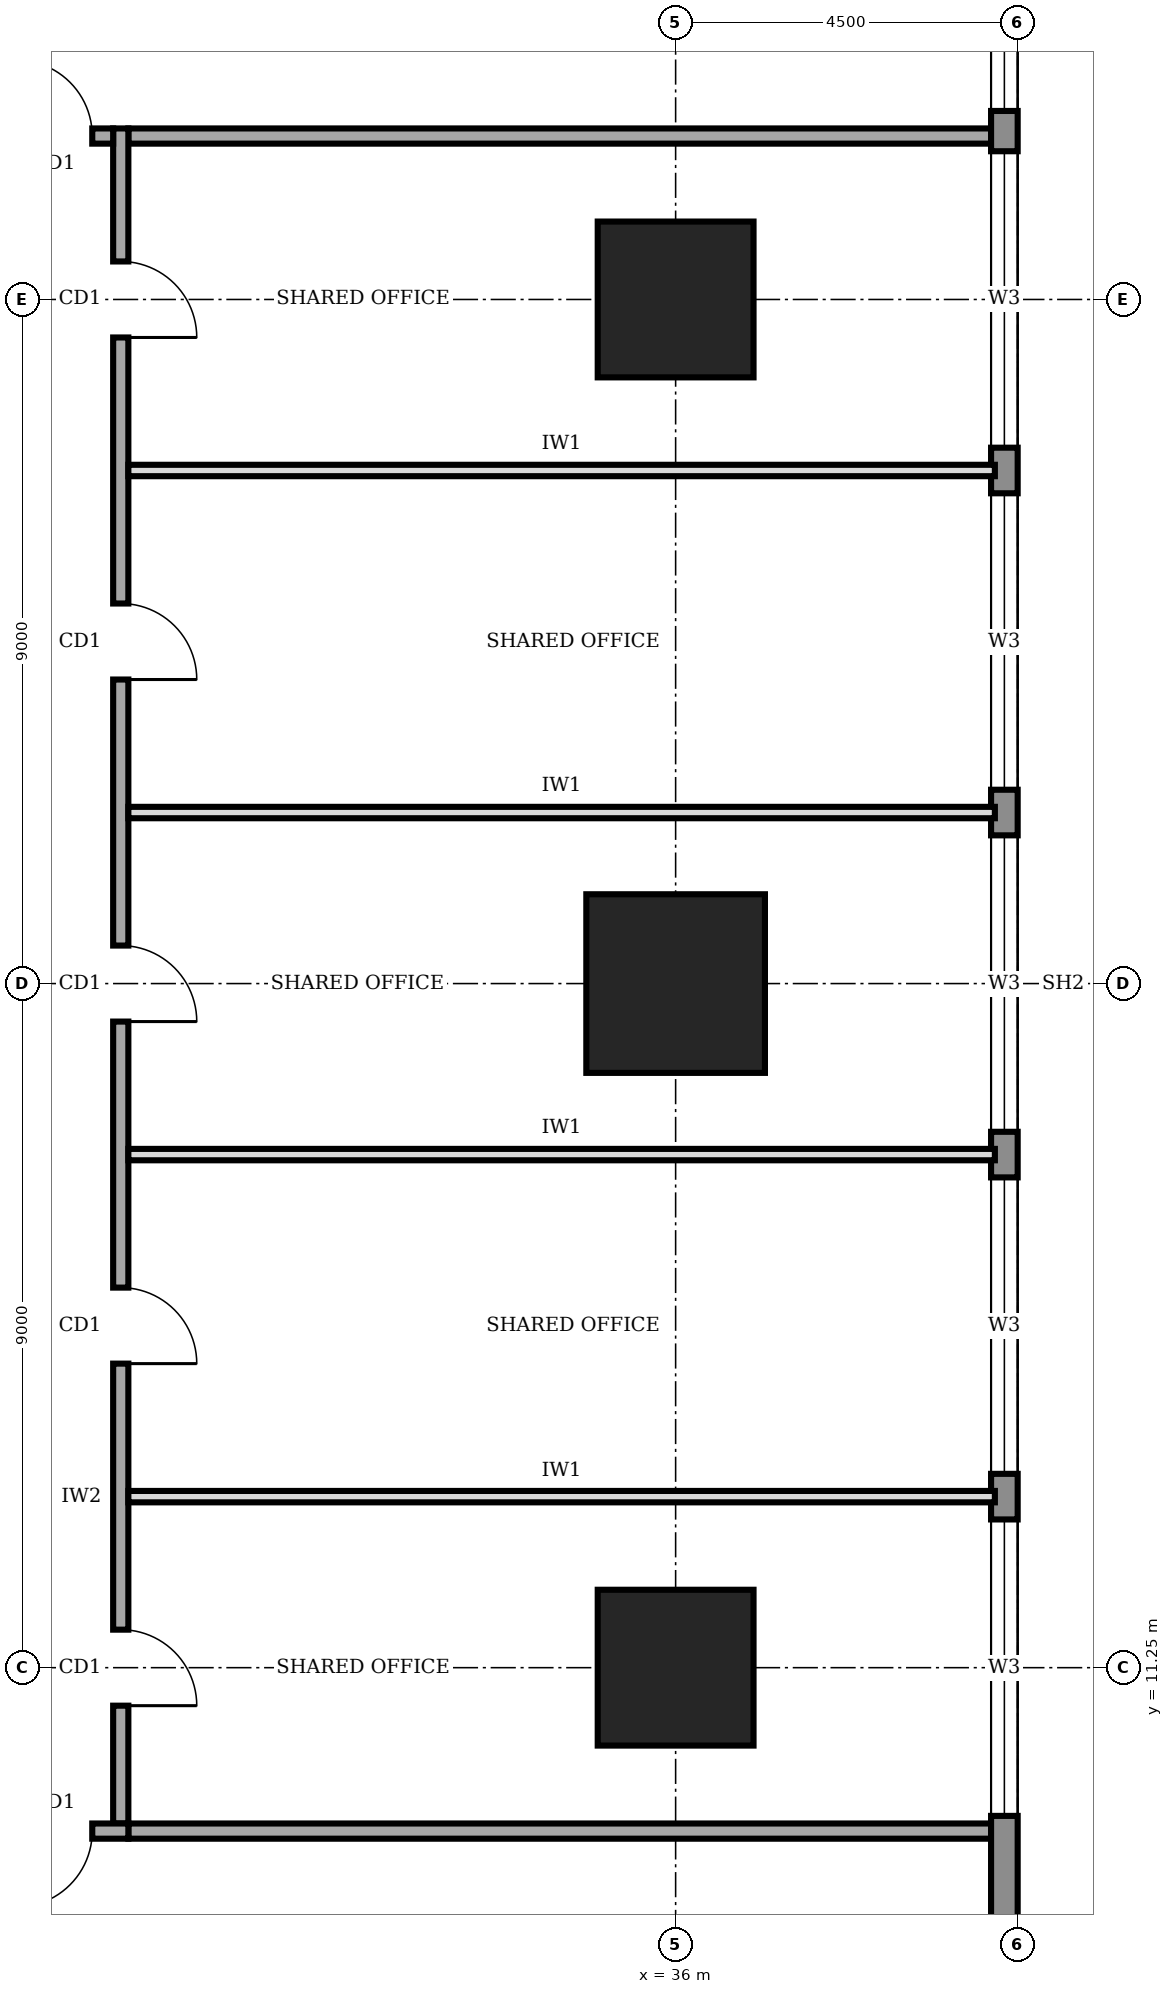
"""IFC4 building model, lengths in metres.
Left out: names, types, materials, properties, quantities, classifications, styles, units other than length and angle.
Written with IfcOpenShell. Run it as: python <this file> out.ifc"""

import sys

from ifc_helpers import new_model, si_unit, direction, frame, frame_2d, origin, origin_2d, place, context, subcontext, project, spatial, rectangle, extrude, element, fill, save


model = new_model("IFC4")
c1 = context("Model", 3, precision=1e-05, world=origin(), true_north=direction((0.0, 1.0)))
c2 = subcontext(c1, "Body", "Model", "MODEL_VIEW")
j1 = project(units=[si_unit("LENGTHUNIT", "METRE"), si_unit("PLANEANGLEUNIT", "RADIAN")], contexts=[c1])
p1 = place(None, origin())
s1 = spatial("IfcSite", under=j1, at=p1, CompositionType="ELEMENT")
p2 = place(p1, origin())
s2 = spatial("IfcBuilding", under=s1, at=p2, CompositionType="ELEMENT")
p3 = place(p2, frame((0.0, 0.0, 185.0)))
s3 = spatial("IfcBuildingStorey", under=s2, at=p3, CompositionType="ELEMENT", Elevation=185.0)
p4 = place(p3, frame((36.0, 11.25, 0.0), z_axis=(0.0, 0.0, 1.0), x_axis=(1.0, 0.0, 0.0)))
e1 = element("IfcColumn", 1, at=p4, inside=s3, PredefinedType="COLUMN", context=c2, shape_type="SweptSolid", body=[
    extrude(rectangle(XDim=2.05, YDim=2.05, at=origin_2d()), origin(), (0.0, 0.0, 1.0), 4.0),
])
p5 = place(p3, frame((36.0, 20.25, 0.0), z_axis=(0.0, 0.0, 1.0), x_axis=(1.0, 0.0, 0.0)))
e2 = element("IfcColumn", 2, at=p5, inside=s3, PredefinedType="COLUMN", context=c2, shape_type="SweptSolid", body=[
    extrude(rectangle(XDim=2.35, YDim=2.35, at=origin_2d()), origin(), (0.0, 0.0, 1.0), 4.0),
])
p6 = place(p3, frame((36.0, 29.25, 0.0), z_axis=(0.0, 0.0, 1.0), x_axis=(1.0, 0.0, 0.0)))
e3 = element("IfcColumn", 3, at=p6, inside=s3, PredefinedType="COLUMN", context=c2, shape_type="SweptSolid", body=[
    extrude(rectangle(XDim=2.05, YDim=2.05, at=origin_2d()), origin(), (0.0, 0.0, 1.0), 4.0),
])
p7 = place(p3, frame((40.325, 4.52, 0.0), z_axis=(0.0, 0.0, 1.0), x_axis=(0.0, 1.0, 0.0)))
e4 = element("IfcWall", 4, at=p7, inside=s3, PredefinedType="STANDARD", context=c2, shape_type="SweptSolid", body=[
    extrude(rectangle(XDim=31.46, YDim=0.35, at=frame_2d((15.73, 0.0))), origin(), (0.0, 0.0, 1.0), 3.75),
])
p8 = place(p7, frame((4.78, 0.0, 0.95)))
e5 = element("IfcOpeningElement", 5, at=p8, cuts=e4, PredefinedType="OPENING", context=c2, shape_type="SweptSolid", body=[
    extrude(rectangle(XDim=3.9, YDim=1.8, at=frame_2d((1.95, 0.9))), frame((0.0, 0.185, 0.0), z_axis=(0.0, -1.0, 0.0), x_axis=(1.0, 0.0, 0.0)), (0.0, 0.0, 1.0), 0.37),
])
p9 = place(p7, frame((9.28, 0.0, 0.95)))
e6 = element("IfcOpeningElement", 6, at=p9, cuts=e4, PredefinedType="OPENING", context=c2, shape_type="SweptSolid", body=[
    extrude(rectangle(XDim=3.9, YDim=1.8, at=frame_2d((1.95, 0.9))), frame((0.0, 0.185, 0.0), z_axis=(0.0, -1.0, 0.0), x_axis=(1.0, 0.0, 0.0)), (0.0, 0.0, 1.0), 0.37),
])
p10 = place(p7, frame((13.78, 0.0, 0.95)))
e7 = element("IfcOpeningElement", 7, at=p10, cuts=e4, PredefinedType="OPENING", context=c2, shape_type="SweptSolid", body=[
    extrude(rectangle(XDim=3.9, YDim=1.8, at=frame_2d((1.95, 0.9))), frame((0.0, 0.185, 0.0), z_axis=(0.0, -1.0, 0.0), x_axis=(1.0, 0.0, 0.0)), (0.0, 0.0, 1.0), 0.37),
])
p11 = place(p7, frame((18.28, 0.0, 0.95)))
e8 = element("IfcOpeningElement", 8, at=p11, cuts=e4, PredefinedType="OPENING", context=c2, shape_type="SweptSolid", body=[
    extrude(rectangle(XDim=3.9, YDim=1.8, at=frame_2d((1.95, 0.9))), frame((0.0, 0.185, 0.0), z_axis=(0.0, -1.0, 0.0), x_axis=(1.0, 0.0, 0.0)), (0.0, 0.0, 1.0), 0.37),
])
p12 = place(p7, frame((22.78, 0.0, 0.95)))
e9 = element("IfcOpeningElement", 9, at=p12, cuts=e4, PredefinedType="OPENING", context=c2, shape_type="SweptSolid", body=[
    extrude(rectangle(XDim=3.9, YDim=1.8, at=frame_2d((1.95, 0.9))), frame((0.0, 0.185, 0.0), z_axis=(0.0, -1.0, 0.0), x_axis=(1.0, 0.0, 0.0)), (0.0, 0.0, 1.0), 0.37),
])
p13 = place(p7, frame((27.21, 0.0, 0.95)))
e10 = element("IfcOpeningElement", 10, at=p13, cuts=e4, PredefinedType="OPENING", context=c2, shape_type="SweptSolid", body=[
    extrude(rectangle(XDim=3.9, YDim=1.8, at=frame_2d((1.95, 0.9))), frame((0.0, 0.185, 0.0), z_axis=(0.0, -1.0, 0.0), x_axis=(1.0, 0.0, 0.0)), (0.0, 0.0, 1.0), 0.37),
])
p14 = place(p3, frame((11.9, 9.1, 0.0), z_axis=(0.0, 0.0, 1.0), x_axis=(1.0, 0.0, 0.0)))
e11 = element("IfcWall", 11, at=p14, inside=s3, PredefinedType="SOLIDWALL", context=c2, shape_type="SweptSolid", body=[
    extrude(rectangle(XDim=16.9, YDim=0.2, at=frame_2d((8.45, 0.0))), origin(), (0.0, 0.0, 1.0), 3.75),
])
p15 = place(p14, frame((15.425, 0.0, 0.0)))
e12 = element("IfcOpeningElement", 12, at=p15, cuts=e11, PredefinedType="OPENING", context=c2, shape_type="SweptSolid", body=[
    extrude(rectangle(XDim=1.0, YDim=2.1, at=frame_2d((0.5, 1.05))), frame((0.0, 0.11, 0.0), z_axis=(0.0, -1.0, 0.0), x_axis=(1.0, 0.0, 0.0)), (0.0, 0.0, 1.0), 0.22),
])
p16 = place(p3, frame((28.7, 9.2, 0.0), z_axis=(0.0, 0.0, 1.0), x_axis=(0.0, 1.0, 0.0)))
e13 = element("IfcWall", 13, at=p16, inside=s3, PredefinedType="SOLIDWALL", context=c2, shape_type="SweptSolid", body=[
    extrude(rectangle(XDim=22.3, YDim=0.2, at=frame_2d((11.15, 0.0))), origin(), (0.0, 0.0, 1.0), 3.75),
])
p17 = place(p16, frame((1.55, 0.0, 0.0)))
e14 = element("IfcOpeningElement", 14, at=p17, cuts=e13, PredefinedType="OPENING", context=c2, shape_type="SweptSolid", body=[
    extrude(rectangle(XDim=1.0, YDim=2.1, at=frame_2d((0.5, 1.05))), frame((0.0, 0.11, 0.0), z_axis=(0.0, -1.0, 0.0), x_axis=(1.0, 0.0, 0.0)), (0.0, 0.0, 1.0), 0.22),
])
p18 = place(p16, frame((6.05, 0.0, 0.0)))
e15 = element("IfcOpeningElement", 15, at=p18, cuts=e13, PredefinedType="OPENING", context=c2, shape_type="SweptSolid", body=[
    extrude(rectangle(XDim=1.0, YDim=2.1, at=frame_2d((0.5, 1.05))), frame((0.0, 0.11, 0.0), z_axis=(0.0, -1.0, 0.0), x_axis=(1.0, 0.0, 0.0)), (0.0, 0.0, 1.0), 0.22),
])
p19 = place(p16, frame((10.55, 0.0, 0.0)))
e16 = element("IfcOpeningElement", 16, at=p19, cuts=e13, PredefinedType="OPENING", context=c2, shape_type="SweptSolid", body=[
    extrude(rectangle(XDim=1.0, YDim=2.1, at=frame_2d((0.5, 1.05))), frame((0.0, 0.11, 0.0), z_axis=(0.0, -1.0, 0.0), x_axis=(1.0, 0.0, 0.0)), (0.0, 0.0, 1.0), 0.22),
])
p20 = place(p16, frame((15.05, 0.0, 0.0)))
e17 = element("IfcOpeningElement", 17, at=p20, cuts=e13, PredefinedType="OPENING", context=c2, shape_type="SweptSolid", body=[
    extrude(rectangle(XDim=1.0, YDim=2.1, at=frame_2d((0.5, 1.05))), frame((0.0, 0.11, 0.0), z_axis=(0.0, -1.0, 0.0), x_axis=(1.0, 0.0, 0.0)), (0.0, 0.0, 1.0), 0.22),
])
p21 = place(p16, frame((19.55, 0.0, 0.0)))
e18 = element("IfcOpeningElement", 18, at=p21, cuts=e13, PredefinedType="OPENING", context=c2, shape_type="SweptSolid", body=[
    extrude(rectangle(XDim=1.0, YDim=2.1, at=frame_2d((0.5, 1.05))), frame((0.0, 0.11, 0.0), z_axis=(0.0, -1.0, 0.0), x_axis=(1.0, 0.0, 0.0)), (0.0, 0.0, 1.0), 0.22),
])
p22 = place(p3, frame((28.6, 31.4, 0.0), z_axis=(0.0, 0.0, 1.0), x_axis=(-1.0, 0.0, 0.0)))
e19 = element("IfcWall", 19, at=p22, inside=s3, PredefinedType="SOLIDWALL", context=c2, shape_type="SweptSolid", body=[
    extrude(rectangle(XDim=16.9, YDim=0.2, at=frame_2d((8.45, 0.0))), origin(), (0.0, 0.0, 1.0), 3.75),
])
p23 = place(p22, frame((15.425, 0.0, 0.0)))
e20 = element("IfcOpeningElement", 20, at=p23, cuts=e19, PredefinedType="OPENING", context=c2, shape_type="SweptSolid", body=[
    extrude(rectangle(XDim=1.0, YDim=2.1, at=frame_2d((0.5, 1.05))), frame((0.0, 0.11, 0.0), z_axis=(0.0, -1.0, 0.0), x_axis=(1.0, 0.0, 0.0)), (0.0, 0.0, 1.0), 0.22),
])
p24 = place(p22, frame((12.35, 0.0, 0.0)))
e21 = element("IfcOpeningElement", 21, at=p24, cuts=e19, PredefinedType="OPENING", context=c2, shape_type="SweptSolid", body=[
    extrude(rectangle(XDim=1.0, YDim=2.1, at=frame_2d((0.5, 1.05))), frame((0.0, 0.11, 0.0), z_axis=(0.0, -1.0, 0.0), x_axis=(1.0, 0.0, 0.0)), (0.0, 0.0, 1.0), 0.22),
])
p25 = place(p22, frame((5.6, 0.0, 0.0)))
e22 = element("IfcOpeningElement", 22, at=p25, cuts=e19, PredefinedType="OPENING", context=c2, shape_type="SweptSolid", body=[
    extrude(rectangle(XDim=1.0, YDim=2.1, at=frame_2d((0.5, 1.05))), frame((0.0, 0.11, 0.0), z_axis=(0.0, -1.0, 0.0), x_axis=(1.0, 0.0, 0.0)), (0.0, 0.0, 1.0), 0.22),
])
p26 = place(p22, frame((0.275, 0.0, 0.0)))
e23 = element("IfcOpeningElement", 23, at=p26, cuts=e19, PredefinedType="OPENING", context=c2, shape_type="SweptSolid", body=[
    extrude(rectangle(XDim=1.0, YDim=2.1, at=frame_2d((0.5, 1.05))), frame((0.0, 0.11, 0.0), z_axis=(0.0, -1.0, 0.0), x_axis=(1.0, 0.0, 0.0)), (0.0, 0.0, 1.0), 0.22),
])
for number, where, z_axis, x_axis in (
    (24, (28.8, 9.1, 0.0), (0.0, 0.0, 1.0), (1.0, 0.0, 0.0)),
    (25, (28.8, 31.4, 0.0), (0.0, 0.0, 1.0), (1.0, 0.0, 0.0)),
):
    element("IfcWall", number, at=place(p3, frame(where, z_axis=z_axis, x_axis=x_axis)), inside=s3, PredefinedType="SOLIDWALL", context=c2, shape_type="SweptSolid", body=[
        extrude(rectangle(XDim=11.4, YDim=0.2, at=frame_2d((5.7, 0.0))), origin(), (0.0, 0.0, 1.0), 3.75),
    ])
for number, where, z_axis, x_axis in (
    (26, (28.8, 13.5, 0.0), (0.0, 0.0, 1.0), (1.0, 0.0, 0.0)),
    (27, (28.8, 18.0, 0.0), (0.0, 0.0, 1.0), (1.0, 0.0, 0.0)),
    (28, (28.8, 22.5, 0.0), (0.0, 0.0, 1.0), (1.0, 0.0, 0.0)),
    (29, (28.8, 27.0, 0.0), (0.0, 0.0, 1.0), (1.0, 0.0, 0.0)),
):
    element("IfcWall", number, at=place(p3, frame(where, z_axis=z_axis, x_axis=x_axis)), inside=s3, PredefinedType="PARTITIONING", context=c2, shape_type="SweptSolid", body=[
        extrude(rectangle(XDim=11.4, YDim=0.15, at=frame_2d((5.7, 0.0))), origin(), (0.0, 0.0, 1.0), 3.75),
    ])
p27 = place(p8, origin())
e30 = element("IfcWindow", 30, at=p27, inside=s3, PartitioningType="SINGLE_PANEL", PredefinedType="WINDOW", context=c2, shape_type="SweptSolid", body=[
    extrude(rectangle(XDim=3.9, YDim=1.8, at=frame_2d((1.95, 0.9))), frame((0.0, 0.03, 0.0), z_axis=(0.0, -1.0, 0.0), x_axis=(1.0, 0.0, 0.0)), (0.0, 0.0, 1.0), 0.06),
])
fill(e5, e30)
p28 = place(p9, origin())
e31 = element("IfcWindow", 31, at=p28, inside=s3, PartitioningType="SINGLE_PANEL", PredefinedType="WINDOW", context=c2, shape_type="SweptSolid", body=[
    extrude(rectangle(XDim=3.9, YDim=1.8, at=frame_2d((1.95, 0.9))), frame((0.0, 0.03, 0.0), z_axis=(0.0, -1.0, 0.0), x_axis=(1.0, 0.0, 0.0)), (0.0, 0.0, 1.0), 0.06),
])
fill(e6, e31)
p29 = place(p10, origin())
e32 = element("IfcWindow", 32, at=p29, inside=s3, PartitioningType="SINGLE_PANEL", PredefinedType="WINDOW", context=c2, shape_type="SweptSolid", body=[
    extrude(rectangle(XDim=3.9, YDim=1.8, at=frame_2d((1.95, 0.9))), frame((0.0, 0.03, 0.0), z_axis=(0.0, -1.0, 0.0), x_axis=(1.0, 0.0, 0.0)), (0.0, 0.0, 1.0), 0.06),
])
fill(e7, e32)
p30 = place(p11, origin())
e33 = element("IfcWindow", 33, at=p30, inside=s3, PartitioningType="SINGLE_PANEL", PredefinedType="WINDOW", context=c2, shape_type="SweptSolid", body=[
    extrude(rectangle(XDim=3.9, YDim=1.8, at=frame_2d((1.95, 0.9))), frame((0.0, 0.03, 0.0), z_axis=(0.0, -1.0, 0.0), x_axis=(1.0, 0.0, 0.0)), (0.0, 0.0, 1.0), 0.06),
])
fill(e8, e33)
p31 = place(p12, origin())
e34 = element("IfcWindow", 34, at=p31, inside=s3, PartitioningType="SINGLE_PANEL", PredefinedType="WINDOW", context=c2, shape_type="SweptSolid", body=[
    extrude(rectangle(XDim=3.9, YDim=1.8, at=frame_2d((1.95, 0.9))), frame((0.0, 0.03, 0.0), z_axis=(0.0, -1.0, 0.0), x_axis=(1.0, 0.0, 0.0)), (0.0, 0.0, 1.0), 0.06),
])
fill(e9, e34)
p32 = place(p13, origin())
e35 = element("IfcWindow", 35, at=p32, inside=s3, PartitioningType="SINGLE_PANEL", PredefinedType="WINDOW", context=c2, shape_type="SweptSolid", body=[
    extrude(rectangle(XDim=3.9, YDim=1.8, at=frame_2d((1.95, 0.9))), frame((0.0, 0.03, 0.0), z_axis=(0.0, -1.0, 0.0), x_axis=(1.0, 0.0, 0.0)), (0.0, 0.0, 1.0), 0.06),
])
fill(e10, e35)
p33 = place(p15, frame((1.0, 0.0, 0.0), z_axis=(0.0, 0.0, 1.0), x_axis=(-1.0, 0.0, 0.0)))
e36 = element("IfcDoor", 36, at=p33, inside=s3, OperationType="SINGLE_SWING_RIGHT", PredefinedType="DOOR", context=c2, shape_type="SweptSolid", body=[
    extrude(rectangle(XDim=1.0, YDim=2.1, at=frame_2d((0.5, 1.05))), frame((0.0, 0.025, 0.0), z_axis=(0.0, -1.0, 0.0), x_axis=(1.0, 0.0, 0.0)), (0.0, 0.0, 1.0), 0.05),
])
fill(e12, e36)
p34 = place(p17, frame((1.0, 0.0, 0.0), z_axis=(0.0, 0.0, 1.0), x_axis=(-1.0, 0.0, 0.0)))
e37 = element("IfcDoor", 37, at=p34, inside=s3, OperationType="SINGLE_SWING_RIGHT", PredefinedType="DOOR", context=c2, shape_type="SweptSolid", body=[
    extrude(rectangle(XDim=1.0, YDim=2.1, at=frame_2d((0.5, 1.05))), frame((0.0, 0.025, 0.0), z_axis=(0.0, -1.0, 0.0), x_axis=(1.0, 0.0, 0.0)), (0.0, 0.0, 1.0), 0.05),
])
fill(e14, e37)
p35 = place(p18, frame((1.0, 0.0, 0.0), z_axis=(0.0, 0.0, 1.0), x_axis=(-1.0, 0.0, 0.0)))
e38 = element("IfcDoor", 38, at=p35, inside=s3, OperationType="SINGLE_SWING_RIGHT", PredefinedType="DOOR", context=c2, shape_type="SweptSolid", body=[
    extrude(rectangle(XDim=1.0, YDim=2.1, at=frame_2d((0.5, 1.05))), frame((0.0, 0.025, 0.0), z_axis=(0.0, -1.0, 0.0), x_axis=(1.0, 0.0, 0.0)), (0.0, 0.0, 1.0), 0.05),
])
fill(e15, e38)
p36 = place(p19, frame((1.0, 0.0, 0.0), z_axis=(0.0, 0.0, 1.0), x_axis=(-1.0, 0.0, 0.0)))
e39 = element("IfcDoor", 39, at=p36, inside=s3, OperationType="SINGLE_SWING_RIGHT", PredefinedType="DOOR", context=c2, shape_type="SweptSolid", body=[
    extrude(rectangle(XDim=1.0, YDim=2.1, at=frame_2d((0.5, 1.05))), frame((0.0, 0.025, 0.0), z_axis=(0.0, -1.0, 0.0), x_axis=(1.0, 0.0, 0.0)), (0.0, 0.0, 1.0), 0.05),
])
fill(e16, e39)
p37 = place(p20, frame((1.0, 0.0, 0.0), z_axis=(0.0, 0.0, 1.0), x_axis=(-1.0, 0.0, 0.0)))
e40 = element("IfcDoor", 40, at=p37, inside=s3, OperationType="SINGLE_SWING_RIGHT", PredefinedType="DOOR", context=c2, shape_type="SweptSolid", body=[
    extrude(rectangle(XDim=1.0, YDim=2.1, at=frame_2d((0.5, 1.05))), frame((0.0, 0.025, 0.0), z_axis=(0.0, -1.0, 0.0), x_axis=(1.0, 0.0, 0.0)), (0.0, 0.0, 1.0), 0.05),
])
fill(e17, e40)
p38 = place(p21, frame((1.0, 0.0, 0.0), z_axis=(0.0, 0.0, 1.0), x_axis=(-1.0, 0.0, 0.0)))
e41 = element("IfcDoor", 41, at=p38, inside=s3, OperationType="SINGLE_SWING_RIGHT", PredefinedType="DOOR", context=c2, shape_type="SweptSolid", body=[
    extrude(rectangle(XDim=1.0, YDim=2.1, at=frame_2d((0.5, 1.05))), frame((0.0, 0.025, 0.0), z_axis=(0.0, -1.0, 0.0), x_axis=(1.0, 0.0, 0.0)), (0.0, 0.0, 1.0), 0.05),
])
fill(e18, e41)
p39 = place(p26, frame((1.0, 0.0, 0.0), z_axis=(0.0, 0.0, 1.0), x_axis=(-1.0, 0.0, 0.0)))
e42 = element("IfcDoor", 42, at=p39, inside=s3, OperationType="SINGLE_SWING_LEFT", PredefinedType="DOOR", context=c2, shape_type="SweptSolid", body=[
    extrude(rectangle(XDim=1.0, YDim=2.1, at=frame_2d((0.5, 1.05))), frame((0.0, 0.025, 0.0), z_axis=(0.0, -1.0, 0.0), x_axis=(1.0, 0.0, 0.0)), (0.0, 0.0, 1.0), 0.05),
])
fill(e23, e42)
save(model, sys.argv[1])
